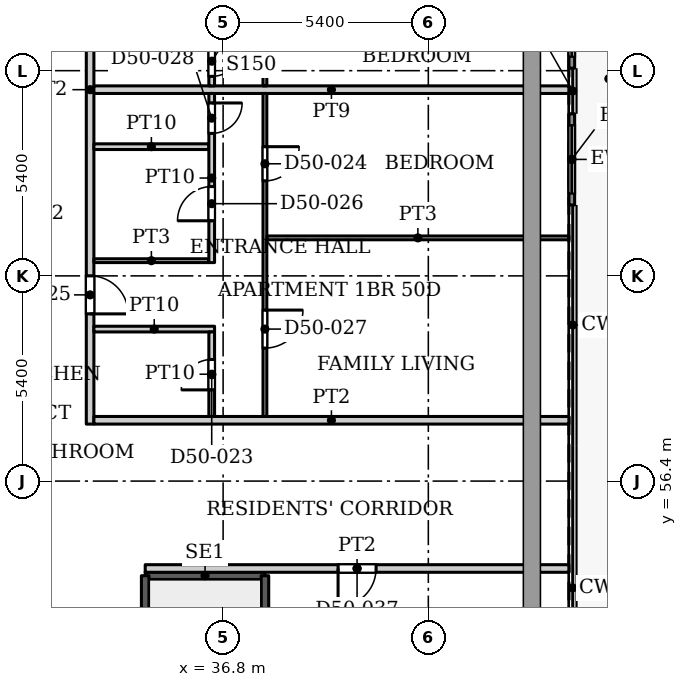
"""IFC4 building model, lengths in metres.
Left out: names, types, materials, properties, quantities, classifications, styles, units other than length and angle.
Written with IfcOpenShell. Run it as: python <this file> out.ifc"""

import sys

from ifc_helpers import new_model, si_unit, direction, frame, frame_2d, origin, place, context, subcontext, project, spatial, rectangle, extrude, source, transform, mapped, element, fill, save


model = new_model("IFC4")
c1 = context("Model", 3, precision=1e-05, world=origin(), true_north=direction((0.0, 1.0)))
c2 = subcontext(c1, "Body", "Model", "MODEL_VIEW")
j1 = project(units=[si_unit("LENGTHUNIT", "METRE"), si_unit("PLANEANGLEUNIT", "RADIAN")], contexts=[c1])
p1 = place(None, origin())
s1 = spatial("IfcSite", under=j1, at=p1, CompositionType="ELEMENT")
p2 = place(p1, origin())
s2 = spatial("IfcBuilding", under=s1, at=p2, CompositionType="ELEMENT")
p3 = place(p2, frame((0.0, 0.0, 216.2)))
s3 = spatial("IfcBuildingStorey", under=s2, at=p3, CompositionType="ELEMENT", Elevation=216.2)
p4 = place(p3, frame((45.975, 69.665, 0.0), z_axis=(0.0, 0.0, 1.0), x_axis=(0.0, -1.0, 0.0)))
e1 = element("IfcWall", 1, at=p4, inside=s3, PredefinedType="SOLIDWALL", context=c2, shape_type="SweptSolid", body=[
    extrude(rectangle(XDim=2.4, YDim=0.15, at=frame_2d((1.2, 0.0))), origin(), (0.0, 0.0, 1.0), 3.75),
])
p5 = place(p4, frame((0.3, 0.0, 0.0)))
e2 = element("IfcOpeningElement", 2, at=p5, cuts=e1, PredefinedType="OPENING", context=c2, shape_type="SweptSolid", body=[
    extrude(rectangle(XDim=1.8, YDim=2.4, at=frame_2d((0.9, 1.2))), frame((0.0, 0.085, 0.0), z_axis=(0.0, -1.0, 0.0), x_axis=(1.0, 0.0, 0.0)), (0.0, 0.0, 1.0), 0.17),
])
p6 = place(p3, frame((45.975, 66.065, 0.0), z_axis=(0.0, 0.0, 1.0), x_axis=(0.0, -1.0, 0.0)))
e3 = element("IfcWall", 3, at=p6, inside=s3, PredefinedType="SOLIDWALL", context=c2, shape_type="SweptSolid", body=[
    extrude(rectangle(XDim=2.4, YDim=0.15, at=frame_2d((1.2, 0.0))), origin(), (0.0, 0.0, 1.0), 3.75),
])
p7 = place(p6, frame((0.3, 0.0, 0.0)))
e4 = element("IfcOpeningElement", 4, at=p7, cuts=e3, PredefinedType="OPENING", context=c2, shape_type="SweptSolid", body=[
    extrude(rectangle(XDim=1.8, YDim=2.4, at=frame_2d((0.9, 1.2))), frame((0.0, 0.085, 0.0), z_axis=(0.0, -1.0, 0.0), x_axis=(1.0, 0.0, 0.0)), (0.0, 0.0, 1.0), 0.17),
])
p8 = place(p3, frame((34.75, 53.91, 0.0), z_axis=(0.0, 0.0, 1.0), x_axis=(1.0, 0.0, 0.0)))
e5 = element("IfcWall", 5, at=p8, inside=s3, PredefinedType="SHEAR", context=c2, shape_type="SweptSolid", body=[
    extrude(rectangle(XDim=3.15, YDim=0.2, at=frame_2d((1.575, 0.0))), origin(), (0.0, 0.0, 1.0), 3.9),
])
p9 = place(p3, frame((34.75, 47.5, 0.0), z_axis=(0.0, 0.0, 1.0), x_axis=(0.0, 1.0, 0.0)))
e6 = element("IfcWall", 6, at=p9, inside=s3, PredefinedType="SHEAR", context=c2, shape_type="SweptSolid", body=[
    extrude(rectangle(XDim=6.41, YDim=0.2, at=frame_2d((3.205, 0.0))), origin(), (0.0, 0.0, 1.0), 3.9),
])
p10 = place(p3, frame((37.9, 44.75, 0.0), z_axis=(0.0, 0.0, 1.0), x_axis=(0.0, 1.0, 0.0)))
e7 = element("IfcWall", 7, at=p10, inside=s3, PredefinedType="SHEAR", context=c2, shape_type="SweptSolid", body=[
    extrude(rectangle(XDim=9.16, YDim=0.2, at=frame_2d((4.58, 0.0))), origin(), (0.0, 0.0, 1.0), 3.9),
])
p11 = place(p3, frame((33.3, 57.9, 0.0), z_axis=(0.0, 0.0, 1.0), x_axis=(0.0, 1.0, 0.0)))
e8 = element("IfcWall", 8, at=p11, inside=s3, PredefinedType="PARTITIONING", context=c2, shape_type="SweptSolid", body=[
    extrude(rectangle(XDim=17.6, YDim=0.2, at=frame_2d((8.8, 0.0))), origin(), (0.0, 0.0, 1.0), 3.6),
])
p12 = place(p11, frame((2.9, 0.0, 0.0)))
e9 = element("IfcOpeningElement", 9, at=p12, cuts=e8, PredefinedType="OPENING", context=c2, shape_type="SweptSolid", body=[
    extrude(rectangle(XDim=1.0, YDim=2.1, at=frame_2d((0.5, 1.05))), frame((0.0, 0.11, 0.0), z_axis=(0.0, -1.0, 0.0), x_axis=(1.0, 0.0, 0.0)), (0.0, 0.0, 1.0), 0.22),
])
p13 = place(p11, frame((10.7, 0.0, 0.0)))
e10 = element("IfcOpeningElement", 10, at=p13, cuts=e8, PredefinedType="OPENING", context=c2, shape_type="SweptSolid", body=[
    extrude(rectangle(XDim=1.0, YDim=2.1, at=frame_2d((0.5, 1.05))), frame((0.0, 0.11, 0.0), z_axis=(0.0, -1.0, 0.0), x_axis=(1.0, 0.0, 0.0)), (0.0, 0.0, 1.0), 0.22),
])
p14 = place(p3, frame((33.4, 58.0, 0.0), z_axis=(0.0, 0.0, 1.0), x_axis=(1.0, 0.0, 0.0)))
e11 = element("IfcWall", 11, at=p14, inside=s3, PredefinedType="PARTITIONING", context=c2, shape_type="SweptSolid", body=[
    extrude(rectangle(XDim=12.5, YDim=0.2, at=frame_2d((6.25, 0.0))), origin(), (0.0, 0.0, 1.0), 3.6),
])
p15 = place(p3, frame((33.4, 60.4, 0.0), z_axis=(0.0, 0.0, 1.0), x_axis=(1.0, 0.0, 0.0)))
e12 = element("IfcWall", 12, at=p15, inside=s3, PredefinedType="PARTITIONING", context=c2, shape_type="SweptSolid", body=[
    extrude(rectangle(XDim=3.175, YDim=0.15, at=frame_2d((1.587, 0.0))), origin(), (0.0, 0.0, 1.0), 3.6),
])
p16 = place(p3, frame((33.4, 62.2, 0.0), z_axis=(0.0, 0.0, 1.0), x_axis=(1.0, 0.0, 0.0)))
e13 = element("IfcWall", 13, at=p16, inside=s3, PredefinedType="PARTITIONING", context=c2, shape_type="SweptSolid", body=[
    extrude(rectangle(XDim=3.025, YDim=0.1, at=frame_2d((1.513, 0.0))), origin(), (0.0, 0.0, 1.0), 3.6),
])
p17 = place(p3, frame((33.4, 65.2, 0.0), z_axis=(0.0, 0.0, 1.0), x_axis=(1.0, 0.0, 0.0)))
e14 = element("IfcWall", 14, at=p17, inside=s3, PredefinedType="PARTITIONING", context=c2, shape_type="SweptSolid", body=[
    extrude(rectangle(XDim=3.025, YDim=0.15, at=frame_2d((1.513, 0.0))), origin(), (0.0, 0.0, 1.0), 3.6),
])
p18 = place(p3, frame((33.4, 66.7, 0.0), z_axis=(0.0, 0.0, 1.0), x_axis=(1.0, 0.0, 0.0)))
e15 = element("IfcWall", 15, at=p18, inside=s3, PredefinedType="PARTITIONING", context=c2, shape_type="SweptSolid", body=[
    extrude(rectangle(XDim=12.5, YDim=0.2, at=frame_2d((6.25, 0.0))), origin(), (0.0, 0.0, 1.0), 3.6),
])
p19 = place(p3, frame((34.75, 54.1, 0.0), z_axis=(0.0, 0.0, 1.0), x_axis=(1.0, 0.0, 0.0)))
e16 = element("IfcWall", 16, at=p19, inside=s3, PredefinedType="PARTITIONING", context=c2, shape_type="SweptSolid", body=[
    extrude(rectangle(XDim=11.15, YDim=0.2, at=frame_2d((5.575, 0.0))), origin(), (0.0, 0.0, 1.0), 3.6),
])
p20 = place(p19, frame((5.075, 0.0, 0.0)))
e17 = element("IfcOpeningElement", 17, at=p20, cuts=e16, PredefinedType="OPENING", context=c2, shape_type="SweptSolid", body=[
    extrude(rectangle(XDim=1.0, YDim=2.1, at=frame_2d((0.5, 1.05))), frame((0.0, 0.11, 0.0), z_axis=(0.0, -1.0, 0.0), x_axis=(1.0, 0.0, 0.0)), (0.0, 0.0, 1.0), 0.22),
])
p21 = place(p3, frame((36.5, 58.1, 0.0), z_axis=(0.0, 0.0, 1.0), x_axis=(0.0, 1.0, 0.0)))
e18 = element("IfcWall", 18, at=p21, inside=s3, PredefinedType="PARTITIONING", context=c2, shape_type="SweptSolid", body=[
    extrude(rectangle(XDim=2.225, YDim=0.15, at=frame_2d((1.112, 0.0))), origin(), (0.0, 0.0, 1.0), 3.6),
])
p22 = place(p21, frame((0.7, 0.0, 0.0)))
e19 = element("IfcOpeningElement", 19, at=p22, cuts=e18, PredefinedType="OPENING", context=c2, shape_type="SweptSolid", body=[
    extrude(rectangle(XDim=0.8, YDim=2.1, at=frame_2d((0.4, 1.05))), frame((0.0, 0.085, 0.0), z_axis=(0.0, -1.0, 0.0), x_axis=(1.0, 0.0, 0.0)), (0.0, 0.0, 1.0), 0.17),
])
p23 = place(p3, frame((36.5, 62.15, 0.0), z_axis=(0.0, 0.0, 1.0), x_axis=(0.0, 1.0, 0.0)))
e20 = element("IfcWall", 20, at=p23, inside=s3, PredefinedType="PARTITIONING", context=c2, shape_type="SweptSolid", body=[
    extrude(rectangle(XDim=4.45, YDim=0.15, at=frame_2d((2.225, 0.0))), origin(), (0.0, 0.0, 1.0), 3.6),
])
p24 = place(p23, frame((1.1, 0.0, 0.0)))
e21 = element("IfcOpeningElement", 21, at=p24, cuts=e20, PredefinedType="OPENING", context=c2, shape_type="SweptSolid", body=[
    extrude(rectangle(XDim=0.9, YDim=2.1, at=frame_2d((0.45, 1.05))), frame((0.0, 0.085, 0.0), z_axis=(0.0, -1.0, 0.0), x_axis=(1.0, 0.0, 0.0)), (0.0, 0.0, 1.0), 0.17),
])
p25 = place(p23, frame((3.4, 0.0, 0.0)))
e22 = element("IfcOpeningElement", 22, at=p25, cuts=e20, PredefinedType="OPENING", context=c2, shape_type="SweptSolid", body=[
    extrude(rectangle(XDim=0.8, YDim=2.1, at=frame_2d((0.4, 1.05))), frame((0.0, 0.085, 0.0), z_axis=(0.0, -1.0, 0.0), x_axis=(1.0, 0.0, 0.0)), (0.0, 0.0, 1.0), 0.17),
])
p26 = place(p3, frame((36.5, 66.8, 0.0), z_axis=(0.0, 0.0, 1.0), x_axis=(0.0, 1.0, 0.0)))
e23 = element("IfcWall", 23, at=p26, inside=s3, PredefinedType="PARTITIONING", context=c2, shape_type="SweptSolid", body=[
    extrude(rectangle(XDim=1.325, YDim=0.15, at=frame_2d((0.663, 0.0))), origin(), (0.0, 0.0, 1.0), 3.6),
])
p27 = place(p26, frame((0.25, 0.0, 0.0)))
e24 = element("IfcOpeningElement", 24, at=p27, cuts=e23, PredefinedType="OPENING", context=c2, shape_type="SweptSolid", body=[
    extrude(rectangle(XDim=0.8, YDim=2.1, at=frame_2d((0.4, 1.05))), frame((0.0, 0.085, 0.0), z_axis=(0.0, -1.0, 0.0), x_axis=(1.0, 0.0, 0.0)), (0.0, 0.0, 1.0), 0.17),
])
p28 = place(p3, frame((37.9, 58.1, 0.0), z_axis=(0.0, 0.0, 1.0), x_axis=(0.0, 1.0, 0.0)))
e25 = element("IfcWall", 25, at=p28, inside=s3, PredefinedType="PARTITIONING", context=c2, shape_type="SweptSolid", body=[
    extrude(rectangle(XDim=8.5, YDim=0.1, at=frame_2d((4.25, 0.0))), origin(), (0.0, 0.0, 1.0), 3.6),
])
p29 = place(p28, frame((6.2, 0.0, 0.0)))
e26 = element("IfcOpeningElement", 26, at=p29, cuts=e25, PredefinedType="OPENING", context=c2, shape_type="SweptSolid", body=[
    extrude(rectangle(XDim=0.9, YDim=2.1, at=frame_2d((0.45, 1.05))), frame((0.0, 0.06, 0.0), z_axis=(0.0, -1.0, 0.0), x_axis=(1.0, 0.0, 0.0)), (0.0, 0.0, 1.0), 0.12),
])
p30 = place(p28, frame((1.8, 0.0, 0.0)))
e27 = element("IfcOpeningElement", 27, at=p30, cuts=e25, PredefinedType="OPENING", context=c2, shape_type="SweptSolid", body=[
    extrude(rectangle(XDim=1.0, YDim=2.1, at=frame_2d((0.5, 1.05))), frame((0.0, 0.06, 0.0), z_axis=(0.0, -1.0, 0.0), x_axis=(1.0, 0.0, 0.0)), (0.0, 0.0, 1.0), 0.12),
])
p31 = place(p3, frame((37.9, 66.8, 0.0), z_axis=(0.0, 0.0, 1.0), x_axis=(0.0, 1.0, 0.0)))
e28 = element("IfcWall", 28, at=p31, inside=s3, PredefinedType="PARTITIONING", context=c2, shape_type="SweptSolid", body=[
    extrude(rectangle(XDim=8.5, YDim=0.1, at=frame_2d((4.25, 0.0))), origin(), (0.0, 0.0, 1.0), 3.6),
])
p32 = place(p31, frame((1.4, 0.0, 0.0)))
e29 = element("IfcOpeningElement", 29, at=p32, cuts=e28, PredefinedType="OPENING", context=c2, shape_type="SweptSolid", body=[
    extrude(rectangle(XDim=0.9, YDim=2.1, at=frame_2d((0.45, 1.05))), frame((0.0, 0.06, 0.0), z_axis=(0.0, -1.0, 0.0), x_axis=(1.0, 0.0, 0.0)), (0.0, 0.0, 1.0), 0.12),
])
p33 = place(p31, frame((5.7, 0.0, 0.0)))
e30 = element("IfcOpeningElement", 30, at=p33, cuts=e28, PredefinedType="OPENING", context=c2, shape_type="SweptSolid", body=[
    extrude(rectangle(XDim=1.0, YDim=2.1, at=frame_2d((0.5, 1.05))), frame((0.0, 0.06, 0.0), z_axis=(0.0, -1.0, 0.0), x_axis=(1.0, 0.0, 0.0)), (0.0, 0.0, 1.0), 0.12),
])
p34 = place(p3, frame((37.95, 62.8, 0.0), z_axis=(0.0, 0.0, 1.0), x_axis=(1.0, 0.0, 0.0)))
e31 = element("IfcWall", 31, at=p34, inside=s3, PredefinedType="PARTITIONING", context=c2, shape_type="SweptSolid", body=[
    extrude(rectangle(XDim=7.95, YDim=0.1, at=frame_2d((3.975, 0.0))), origin(), (0.0, 0.0, 1.0), 3.6),
])
m1 = source(origin(), c2, "Body", "SweptSolid", [
    extrude(rectangle(XDim=1.8, YDim=2.4, at=frame_2d((0.9, 1.2))), frame((0.0, 0.025, 0.0), z_axis=(0.0, -1.0, 0.0), x_axis=(1.0, 0.0, 0.0)), (0.0, 0.0, 1.0), 0.05),
])
p35 = place(p5, origin())
e32 = element("IfcDoor", 32, at=p35, inside=s3, OperationType="SLIDING_TO_LEFT", PredefinedType="DOOR", context=c2, shape_type="MappedRepresentation", body=[
    mapped(m1, transform((0.0, 0.0, 0.0), x_axis=(1.0, 0.0, 0.0), y_axis=(0.0, 1.0, 0.0), z_axis=(0.0, 0.0, 1.0), scale=1.0)),
])
fill(e2, e32)
p36 = place(p7, origin())
e33 = element("IfcDoor", 33, at=p36, inside=s3, OperationType="SLIDING_TO_LEFT", PredefinedType="DOOR", context=c2, shape_type="MappedRepresentation", body=[
    mapped(m1, transform((0.0, 0.0, 0.0), x_axis=(1.0, 0.0, 0.0), y_axis=(0.0, 1.0, 0.0), z_axis=(0.0, 0.0, 1.0), scale=1.0)),
])
fill(e4, e33)
m2 = source(origin(), c2, "Body", "SweptSolid", [
    extrude(rectangle(XDim=0.8, YDim=2.1, at=frame_2d((0.4, 1.05))), frame((0.0, 0.025, 0.0), z_axis=(0.0, -1.0, 0.0), x_axis=(1.0, 0.0, 0.0)), (0.0, 0.0, 1.0), 0.05),
])
p37 = place(p22, origin())
e34 = element("IfcDoor", 34, at=p37, inside=s3, OperationType="SINGLE_SWING_LEFT", PredefinedType="DOOR", context=c2, shape_type="MappedRepresentation", body=[
    mapped(m2, transform((0.0, 0.0, 0.0), x_axis=(1.0, 0.0, 0.0), y_axis=(0.0, 1.0, 0.0), z_axis=(0.0, 0.0, 1.0), scale=1.0)),
])
fill(e19, e34)
m3 = source(origin(), c2, "Body", "SweptSolid", [
    extrude(rectangle(XDim=0.9, YDim=2.1, at=frame_2d((0.45, 1.05))), frame((0.0, 0.025, 0.0), z_axis=(0.0, -1.0, 0.0), x_axis=(1.0, 0.0, 0.0)), (0.0, 0.0, 1.0), 0.05),
])
p38 = place(p29, origin())
e35 = element("IfcDoor", 35, at=p38, inside=s3, OperationType="SINGLE_SWING_RIGHT", PredefinedType="DOOR", context=c2, shape_type="MappedRepresentation", body=[
    mapped(m3, transform((0.0, 0.0, 0.0), x_axis=(1.0, 0.0, 0.0), y_axis=(0.0, 1.0, 0.0), z_axis=(0.0, 0.0, 1.0), scale=1.0)),
])
fill(e26, e35)
m4 = source(origin(), c2, "Body", "SweptSolid", [
    extrude(rectangle(XDim=1.0, YDim=2.1, at=frame_2d((0.5, 1.05))), frame((0.0, 0.025, 0.0), z_axis=(0.0, -1.0, 0.0), x_axis=(1.0, 0.0, 0.0)), (0.0, 0.0, 1.0), 0.05),
])
p39 = place(p12, origin())
e36 = element("IfcDoor", 36, at=p39, inside=s3, OperationType="SINGLE_SWING_RIGHT", PredefinedType="DOOR", context=c2, shape_type="MappedRepresentation", body=[
    mapped(m4, transform((0.0, 0.0, 0.0), x_axis=(1.0, 0.0, 0.0), y_axis=(0.0, 1.0, 0.0), z_axis=(0.0, 0.0, 1.0), scale=1.0)),
])
fill(e9, e36)
p40 = place(p24, origin())
e37 = element("IfcDoor", 37, at=p40, inside=s3, OperationType="SINGLE_SWING_LEFT", PredefinedType="DOOR", context=c2, shape_type="MappedRepresentation", body=[
    mapped(m3, transform((0.0, 0.0, 0.0), x_axis=(1.0, 0.0, 0.0), y_axis=(0.0, 1.0, 0.0), z_axis=(0.0, 0.0, 1.0), scale=1.0)),
])
fill(e21, e37)
m5 = source(origin(), c2, "Body", "SweptSolid", [
    extrude(rectangle(XDim=1.0, YDim=2.1, at=frame_2d((0.5, 1.05))), frame((0.0, 0.025, 0.0), z_axis=(0.0, -1.0, 0.0), x_axis=(1.0, 0.0, 0.0)), (0.0, 0.0, 1.0), 0.05),
])
p41 = place(p30, origin())
e38 = element("IfcDoor", 38, at=p41, inside=s3, OperationType="SINGLE_SWING_RIGHT", PredefinedType="DOOR", context=c2, shape_type="MappedRepresentation", body=[
    mapped(m5, transform((0.0, 0.0, 0.0), x_axis=(1.0, 0.0, 0.0), y_axis=(0.0, 1.0, 0.0), z_axis=(0.0, 0.0, 1.0), scale=1.0)),
])
fill(e27, e38)
p42 = place(p25, origin())
e39 = element("IfcDoor", 39, at=p42, inside=s3, OperationType="SINGLE_SWING_RIGHT", PredefinedType="DOOR", context=c2, shape_type="MappedRepresentation", body=[
    mapped(m2, transform((0.0, 0.0, 0.0), x_axis=(1.0, 0.0, 0.0), y_axis=(0.0, 1.0, 0.0), z_axis=(0.0, 0.0, 1.0), scale=1.0)),
])
fill(e22, e39)
p43 = place(p27, origin())
e40 = element("IfcDoor", 40, at=p43, inside=s3, OperationType="SINGLE_SWING_RIGHT", PredefinedType="DOOR", context=c2, shape_type="MappedRepresentation", body=[
    mapped(m2, transform((0.0, 0.0, 0.0), x_axis=(1.0, 0.0, 0.0), y_axis=(0.0, 1.0, 0.0), z_axis=(0.0, 0.0, 1.0), scale=1.0)),
])
fill(e24, e40)
m6 = source(origin(), c2, "Body", "SweptSolid", [
    extrude(rectangle(XDim=1.0, YDim=2.1, at=frame_2d((0.5, 1.05))), frame((0.0, 0.025, 0.0), z_axis=(0.0, -1.0, 0.0), x_axis=(1.0, 0.0, 0.0)), (0.0, 0.0, 1.0), 0.05),
])
p44 = place(p20, origin())
e41 = element("IfcDoor", 41, at=p44, inside=s3, OperationType="SINGLE_SWING_RIGHT", PredefinedType="DOOR", context=c2, shape_type="MappedRepresentation", body=[
    mapped(m6, transform((0.0, 0.0, 0.0), x_axis=(1.0, 0.0, 0.0), y_axis=(0.0, 1.0, 0.0), z_axis=(0.0, 0.0, 1.0), scale=1.0)),
])
fill(e17, e41)
save(model, sys.argv[1])
